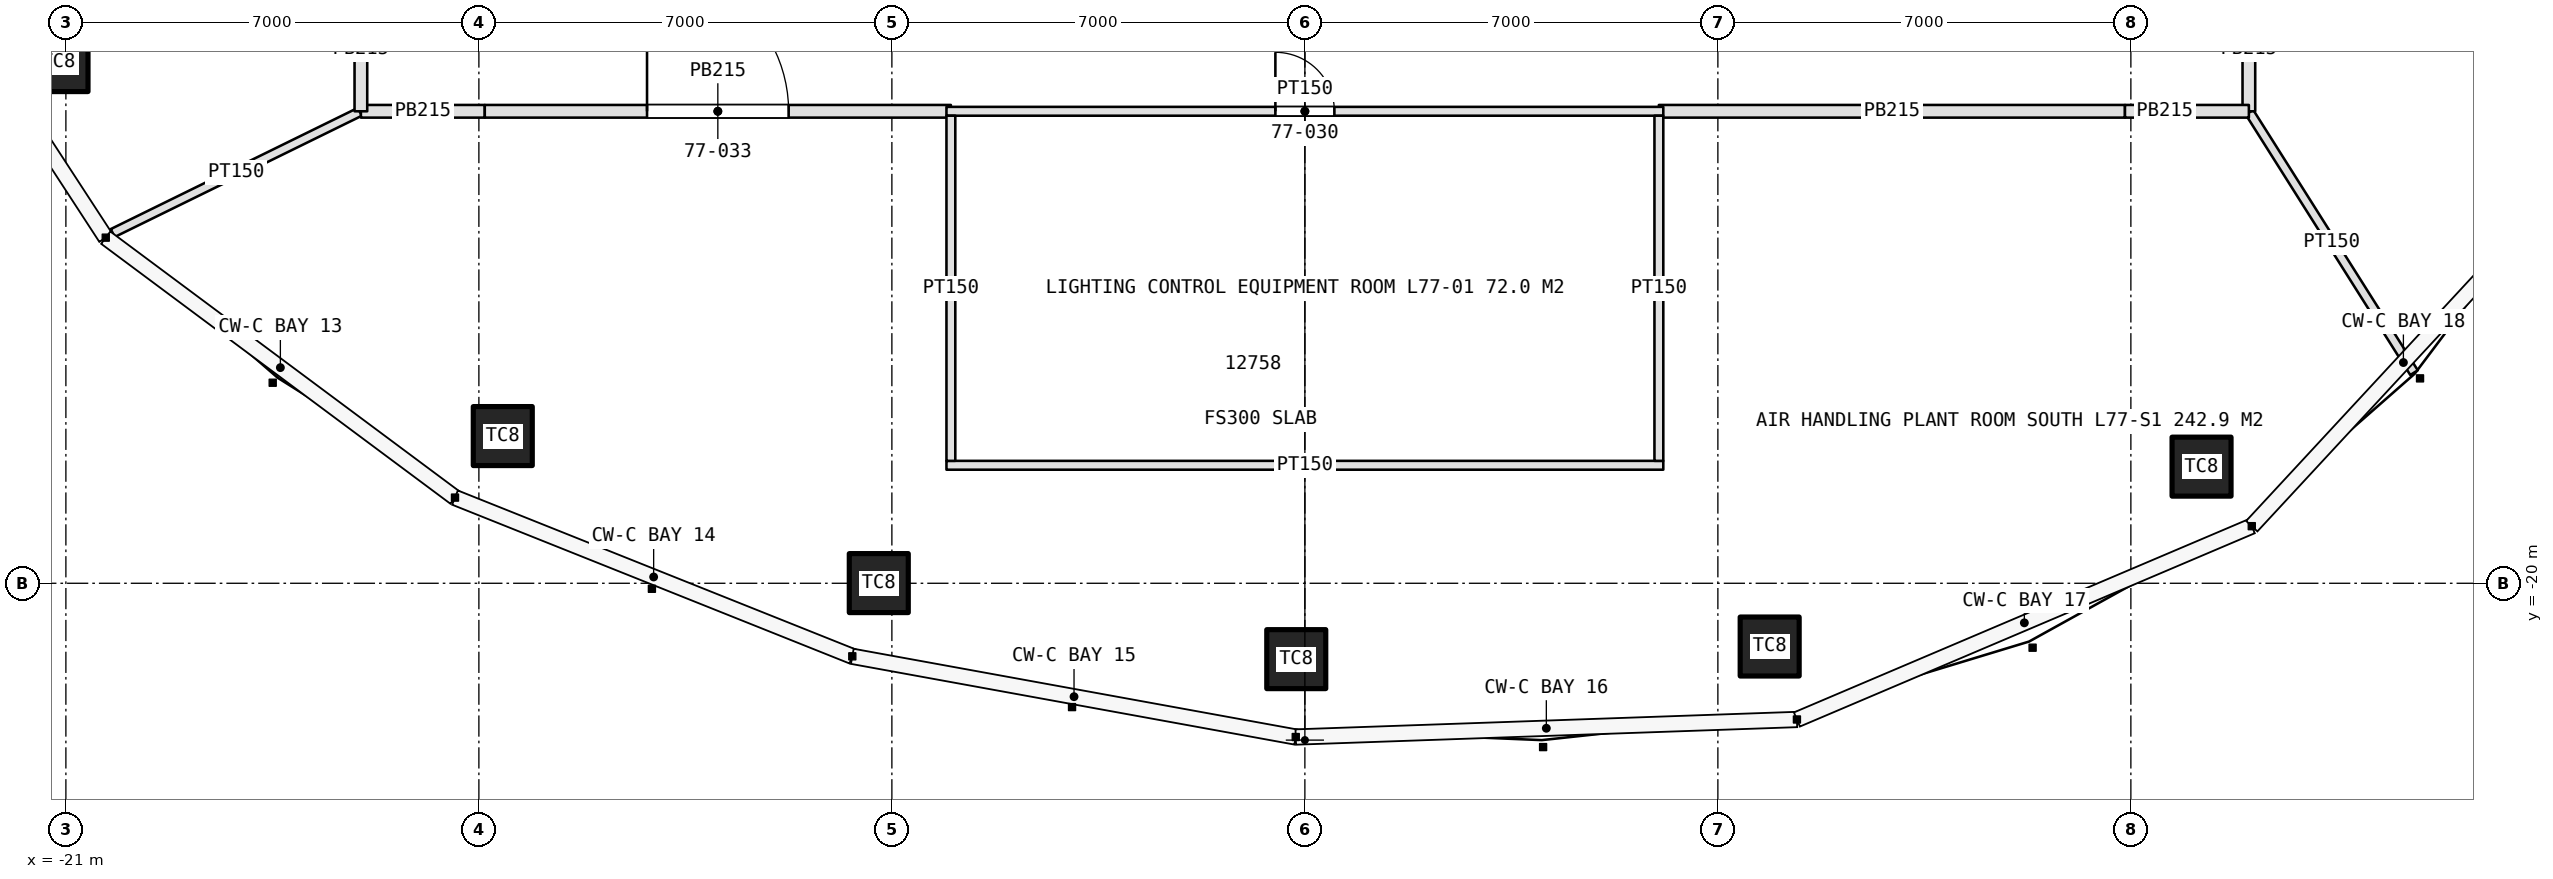
"""IFC4 building model, lengths in metres.
Left out: names, types, materials, properties, quantities, classifications, styles, units other than length and angle.
Written with IfcOpenShell. Run it as: python <this file> out.ifc"""

import sys

from ifc_helpers import new_model, si_unit, direction, frame, frame_2d, origin, origin_2d, place, context, subcontext, project, spatial, rectangle, extrude, element, fill, save


model = new_model("IFC4")
c1 = context("Model", 3, precision=1e-05, world=origin(), true_north=direction((0.0, 1.0)))
c2 = subcontext(c1, "Body", "Model", "MODEL_VIEW")
j1 = project(units=[si_unit("LENGTHUNIT", "METRE"), si_unit("PLANEANGLEUNIT", "RADIAN")], contexts=[c1])
p1 = place(None, origin())
s1 = spatial("IfcSite", under=j1, at=p1, CompositionType="ELEMENT")
p2 = place(p1, origin())
s2 = spatial("IfcBuilding", under=s1, at=p2, CompositionType="ELEMENT")
p3 = place(p2, frame((0.0, 0.0, 344.2)))
s3 = spatial("IfcBuildingStorey", under=s2, at=p3, CompositionType="ELEMENT", Elevation=344.2)
for number, where, z_axis, x_axis in (
    (1, (-21.125, -11.166, 0.0), (0.0, 0.0, 1.0), (1.0, 0.0, 0.0)),
    (2, (-13.595, -17.505, 0.0), (0.0, 0.0, 1.0), (1.0, 0.0, 0.0)),
    (3, (-7.222, -19.997, 0.0), (0.0, 0.0, 1.0), (1.0, 0.0, 0.0)),
    (4, (-0.146, -21.286, 0.0), (0.0, 0.0, 1.0), (1.0, 0.0, 0.0)),
    (5, (7.878, -21.072, 0.0), (0.0, 0.0, 1.0), (1.0, 0.0, 0.0)),
    (6, (15.198, -18.023, 0.0), (0.0, 0.0, 1.0), (1.0, 0.0, 0.0)),
):
    element("IfcColumn", number, at=place(p3, frame(where, z_axis=z_axis, x_axis=x_axis)), inside=s3, PredefinedType="COLUMN", context=c2, shape_type="SweptSolid", body=[
        extrude(rectangle(XDim=1.0, YDim=1.0, at=origin_2d()), origin(), (0.0, 0.0, 1.0), 5.0),
    ])
p4 = place(p3, frame((-16.018, -12.009, 0.0), z_axis=(0.0, 0.0, 1.0), x_axis=(-0.897771840996, -0.440460805879, 0.0)))
e7 = element("IfcWall", 7, at=p4, inside=s3, PredefinedType="PARTITIONING", context=c2, shape_type="SweptSolid", body=[
    extrude(rectangle(XDim=4.666, YDim=0.15, at=frame_2d((2.333, 0.0))), origin(), (0.0, 0.0, 1.0), 4.2),
])
p5 = place(p3, frame((16.011, -12.017, 0.0), z_axis=(0.0, 0.0, 1.0), x_axis=(0.53415837449, -0.845384427916, 0.0)))
e8 = element("IfcWall", 8, at=p5, inside=s3, PredefinedType="PARTITIONING", context=c2, shape_type="SweptSolid", body=[
    extrude(rectangle(XDim=5.22, YDim=0.15, at=frame_2d((2.61, 0.0))), origin(), (0.0, 0.0, 1.0), 4.2),
])
for number, where, z_axis, x_axis in (
    (9, (16.0, -12.0, 0.0), (0.0, 0.0, 1.0), (0.0, 1.0, 0.0)),
    (10, (-16.0, -12.0, 0.0), (0.0, 0.0, 1.0), (1.0, 0.0, 0.0)),
):
    element("IfcWall", number, at=place(p3, frame(where, z_axis=z_axis, x_axis=x_axis)), inside=s3, PredefinedType="PARTITIONING", context=c2, shape_type="SweptSolid", body=[
        extrude(rectangle(XDim=2.1, YDim=0.215, at=frame_2d((1.05, 0.0))), origin(), (0.0, 0.0, 1.0), 4.2),
    ])
p6 = place(p3, frame((-13.9, -12.0, 0.0), z_axis=(0.0, 0.0, 1.0), x_axis=(1.0, 0.0, 0.0)))
e11 = element("IfcWall", 11, at=p6, inside=s3, PredefinedType="PARTITIONING", context=c2, shape_type="SweptSolid", body=[
    extrude(rectangle(XDim=7.9, YDim=0.215, at=frame_2d((3.95, 0.0))), origin(), (0.0, 0.0, 1.0), 4.2),
])
p7 = place(p6, frame((2.75, 0.0, 0.0)))
e12 = element("IfcOpeningElement", 12, at=p7, cuts=e11, PredefinedType="OPENING", context=c2, shape_type="SweptSolid", body=[
    extrude(rectangle(XDim=2.4, YDim=2.4, at=frame_2d((1.2, 1.2))), frame((0.0, 0.118, 0.0), z_axis=(0.0, -1.0, 0.0), x_axis=(1.0, 0.0, 0.0)), (0.0, 0.0, 1.0), 0.235),
])
p8 = place(p3, frame((6.0, -12.0, 0.0), z_axis=(0.0, 0.0, 1.0), x_axis=(1.0, 0.0, 0.0)))
e13 = element("IfcWall", 13, at=p8, inside=s3, PredefinedType="PARTITIONING", context=c2, shape_type="SweptSolid", body=[
    extrude(rectangle(XDim=7.9, YDim=0.215, at=frame_2d((3.95, 0.0))), origin(), (0.0, 0.0, 1.0), 4.2),
])
for number, where, z_axis, x_axis in (
    (14, (13.9, -12.0, 0.0), (0.0, 0.0, 1.0), (1.0, 0.0, 0.0)),
    (15, (-16.0, -9.9, 0.0), (0.0, 0.0, 1.0), (0.0, -1.0, 0.0)),
):
    element("IfcWall", number, at=place(p3, frame(where, z_axis=z_axis, x_axis=x_axis)), inside=s3, PredefinedType="PARTITIONING", context=c2, shape_type="SweptSolid", body=[
        extrude(rectangle(XDim=2.1, YDim=0.215, at=frame_2d((1.05, 0.0))), origin(), (0.0, 0.0, 1.0), 4.2),
    ])
p9 = place(p3, frame((-6.075, -18.0, 0.0), z_axis=(0.0, 0.0, 1.0), x_axis=(1.0, 0.0, 0.0)))
e16 = element("IfcWall", 16, at=p9, inside=s3, PredefinedType="PARTITIONING", context=c2, shape_type="SweptSolid", body=[
    extrude(rectangle(XDim=12.15, YDim=0.15, at=frame_2d((6.075, 0.0))), origin(), (0.0, 0.0, 1.0), 4.2),
])
p10 = place(p3, frame((-6.075, -12.0, 0.0), z_axis=(0.0, 0.0, 1.0), x_axis=(1.0, 0.0, 0.0)))
e17 = element("IfcWall", 17, at=p10, inside=s3, PredefinedType="PARTITIONING", context=c2, shape_type="SweptSolid", body=[
    extrude(rectangle(XDim=12.15, YDim=0.15, at=frame_2d((6.075, 0.0))), origin(), (0.0, 0.0, 1.0), 4.2),
])
p11 = place(p10, frame((5.575, 0.0, 0.0)))
e18 = element("IfcOpeningElement", 18, at=p11, cuts=e17, PredefinedType="OPENING", context=c2, shape_type="SweptSolid", body=[
    extrude(rectangle(XDim=1.0, YDim=2.2, at=frame_2d((0.5, 1.1))), frame((0.0, 0.085, 0.0), z_axis=(0.0, -1.0, 0.0), x_axis=(1.0, 0.0, 0.0)), (0.0, 0.0, 1.0), 0.17),
])
for number, where, z_axis, x_axis in (
    (19, (-6.0, -17.925, 0.0), (0.0, 0.0, 1.0), (0.0, 1.0, 0.0)),
    (20, (6.0, -17.925, 0.0), (0.0, 0.0, 1.0), (0.0, 1.0, 0.0)),
):
    element("IfcWall", number, at=place(p3, frame(where, z_axis=z_axis, x_axis=x_axis)), inside=s3, PredefinedType="PARTITIONING", context=c2, shape_type="SweptSolid", body=[
        extrude(rectangle(XDim=5.85, YDim=0.15, at=frame_2d((2.925, 0.0))), origin(), (0.0, 0.0, 1.0), 4.2),
    ])
p12 = place(p11, origin())
e21 = element("IfcDoor", 21, at=p12, inside=s3, OperationType="SINGLE_SWING_LEFT", PredefinedType="DOOR", context=c2, shape_type="SweptSolid", body=[
    extrude(rectangle(XDim=1.0, YDim=2.2, at=frame_2d((0.5, 1.1))), frame((0.0, 0.025, 0.0), z_axis=(0.0, -1.0, 0.0), x_axis=(1.0, 0.0, 0.0)), (0.0, 0.0, 1.0), 0.05),
])
fill(e18, e21)
p13 = place(p7, origin())
e22 = element("IfcDoor", 22, at=p13, inside=s3, OperationType="DOUBLE_DOOR_SINGLE_SWING", PredefinedType="DOOR", context=c2, shape_type="SweptSolid", body=[
    extrude(rectangle(XDim=2.4, YDim=2.4, at=frame_2d((1.2, 1.2))), frame((0.0, 0.025, 0.0), z_axis=(0.0, -1.0, 0.0), x_axis=(1.0, 0.0, 0.0)), (0.0, 0.0, 1.0), 0.05),
])
fill(e12, e22)
save(model, sys.argv[1])
